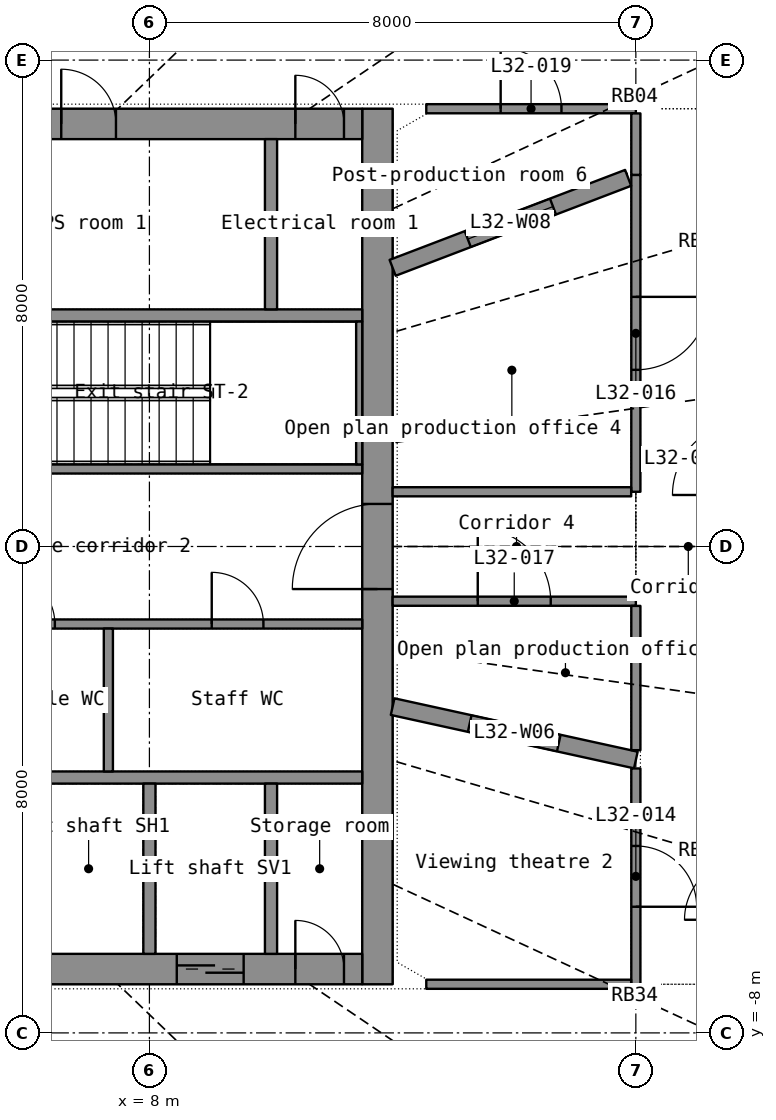
"""IFC4 building model, lengths in metres.
Left out: names, types, materials, properties, quantities, classifications, styles, units other than length and angle.
Written with IfcOpenShell. Run it as: python <this file> out.ifc"""

import sys

from ifc_helpers import new_model, si_unit, direction, frame, frame_2d, origin, place, context, subcontext, project, spatial, rectangle, extrude, element, fill, save


model = new_model("IFC4")
c1 = context("Model", 3, precision=1e-05, world=origin(), true_north=direction((0.0, 1.0)))
c2 = subcontext(c1, "Body", "Model", "MODEL_VIEW")
j1 = project(units=[si_unit("LENGTHUNIT", "METRE"), si_unit("PLANEANGLEUNIT", "RADIAN")], contexts=[c1])
p1 = place(None, origin())
s1 = spatial("IfcSite", under=j1, at=p1, CompositionType="ELEMENT")
p2 = place(p1, origin())
s2 = spatial("IfcBuilding", under=s1, at=p2, CompositionType="ELEMENT")
p3 = place(p2, frame((0.0, 0.0, 134.1)))
s3 = spatial("IfcBuildingStorey", under=s2, at=p3, CompositionType="ELEMENT", Elevation=134.1)
p4 = place(p3, frame((11.75, -7.2, 0.0), z_axis=(0.0, 0.0, 1.0), x_axis=(0.0, 1.0, 0.0)))
e1 = element("IfcWall", 1, at=p4, inside=s3, PredefinedType="SHEAR", context=c2, shape_type="SweptSolid", body=[
    extrude(rectangle(XDim=14.4, YDim=0.5, at=frame_2d((7.2, 0.0))), origin(), (0.0, 0.0, 1.0), 3.3),
])
p5 = place(p4, frame((6.5, 0.0, 0.0)))
e2 = element("IfcOpeningElement", 2, at=p5, cuts=e1, PredefinedType="OPENING", context=c2, shape_type="SweptSolid", body=[
    extrude(rectangle(XDim=1.4, YDim=2.2, at=frame_2d((0.7, 1.1))), frame((0.0, 0.26, 0.0), z_axis=(0.0, -1.0, 0.0), x_axis=(1.0, 0.0, 0.0)), (0.0, 0.0, 1.0), 0.52),
])
p6 = place(p3, frame((-11.5, -6.95, 0.0), z_axis=(0.0, 0.0, 1.0), x_axis=(1.0, 0.0, 0.0)))
e3 = element("IfcWall", 3, at=p6, inside=s3, PredefinedType="SHEAR", context=c2, shape_type="SweptSolid", body=[
    extrude(rectangle(XDim=23.0, YDim=0.5, at=frame_2d((11.5, 0.0))), origin(), (0.0, 0.0, 1.0), 3.3),
])
p7 = place(p6, frame((1.95, 0.0, 0.0)))
e4 = element("IfcOpeningElement", 4, at=p7, cuts=e3, PredefinedType="OPENING", context=c2, shape_type="SweptSolid", body=[
    extrude(rectangle(XDim=1.1, YDim=2.2, at=frame_2d((0.55, 1.1))), frame((0.0, 0.26, 0.0), z_axis=(0.0, -1.0, 0.0), x_axis=(1.0, 0.0, 0.0)), (0.0, 0.0, 1.0), 0.52),
])
p8 = place(p6, frame((3.95, 0.0, 0.0)))
e5 = element("IfcOpeningElement", 5, at=p8, cuts=e3, PredefinedType="OPENING", context=c2, shape_type="SweptSolid", body=[
    extrude(rectangle(XDim=1.1, YDim=2.2, at=frame_2d((0.55, 1.1))), frame((0.0, 0.26, 0.0), z_axis=(0.0, -1.0, 0.0), x_axis=(1.0, 0.0, 0.0)), (0.0, 0.0, 1.0), 0.52),
])
p9 = place(p6, frame((5.95, 0.0, 0.0)))
e6 = element("IfcOpeningElement", 6, at=p9, cuts=e3, PredefinedType="OPENING", context=c2, shape_type="SweptSolid", body=[
    extrude(rectangle(XDim=1.1, YDim=2.2, at=frame_2d((0.55, 1.1))), frame((0.0, 0.26, 0.0), z_axis=(0.0, -1.0, 0.0), x_axis=(1.0, 0.0, 0.0)), (0.0, 0.0, 1.0), 0.52),
])
p10 = place(p6, frame((7.95, 0.0, 0.0)))
e7 = element("IfcOpeningElement", 7, at=p10, cuts=e3, PredefinedType="OPENING", context=c2, shape_type="SweptSolid", body=[
    extrude(rectangle(XDim=1.1, YDim=2.2, at=frame_2d((0.55, 1.1))), frame((0.0, 0.26, 0.0), z_axis=(0.0, -1.0, 0.0), x_axis=(1.0, 0.0, 0.0)), (0.0, 0.0, 1.0), 0.52),
])
p11 = place(p6, frame((9.95, 0.0, 0.0)))
e8 = element("IfcOpeningElement", 8, at=p11, cuts=e3, PredefinedType="OPENING", context=c2, shape_type="SweptSolid", body=[
    extrude(rectangle(XDim=1.1, YDim=2.2, at=frame_2d((0.55, 1.1))), frame((0.0, 0.26, 0.0), z_axis=(0.0, -1.0, 0.0), x_axis=(1.0, 0.0, 0.0)), (0.0, 0.0, 1.0), 0.52),
])
p12 = place(p6, frame((11.95, 0.0, 0.0)))
e9 = element("IfcOpeningElement", 9, at=p12, cuts=e3, PredefinedType="OPENING", context=c2, shape_type="SweptSolid", body=[
    extrude(rectangle(XDim=1.1, YDim=2.2, at=frame_2d((0.55, 1.1))), frame((0.0, 0.26, 0.0), z_axis=(0.0, -1.0, 0.0), x_axis=(1.0, 0.0, 0.0)), (0.0, 0.0, 1.0), 0.52),
])
p13 = place(p6, frame((13.95, 0.0, 0.0)))
e10 = element("IfcOpeningElement", 10, at=p13, cuts=e3, PredefinedType="OPENING", context=c2, shape_type="SweptSolid", body=[
    extrude(rectangle(XDim=1.1, YDim=2.2, at=frame_2d((0.55, 1.1))), frame((0.0, 0.26, 0.0), z_axis=(0.0, -1.0, 0.0), x_axis=(1.0, 0.0, 0.0)), (0.0, 0.0, 1.0), 0.52),
])
p14 = place(p6, frame((15.95, 0.0, 0.0)))
e11 = element("IfcOpeningElement", 11, at=p14, cuts=e3, PredefinedType="OPENING", context=c2, shape_type="SweptSolid", body=[
    extrude(rectangle(XDim=1.1, YDim=2.2, at=frame_2d((0.55, 1.1))), frame((0.0, 0.26, 0.0), z_axis=(0.0, -1.0, 0.0), x_axis=(1.0, 0.0, 0.0)), (0.0, 0.0, 1.0), 0.52),
])
p15 = place(p6, frame((19.95, 0.0, 0.0)))
e12 = element("IfcOpeningElement", 12, at=p15, cuts=e3, PredefinedType="OPENING", context=c2, shape_type="SweptSolid", body=[
    extrude(rectangle(XDim=1.1, YDim=2.2, at=frame_2d((0.55, 1.1))), frame((0.0, 0.26, 0.0), z_axis=(0.0, -1.0, 0.0), x_axis=(1.0, 0.0, 0.0)), (0.0, 0.0, 1.0), 0.52),
])
p16 = place(p6, frame((0.3, 0.0, 0.0)))
e13 = element("IfcOpeningElement", 13, at=p16, cuts=e3, PredefinedType="OPENING", context=c2, shape_type="SweptSolid", body=[
    extrude(rectangle(XDim=0.8, YDim=2.05, at=frame_2d((0.4, 1.025))), frame((0.0, 0.26, 0.0), z_axis=(0.0, -1.0, 0.0), x_axis=(1.0, 0.0, 0.0)), (0.0, 0.0, 1.0), 0.52),
])
p17 = place(p6, frame((21.9, 0.0, 0.0)))
e14 = element("IfcOpeningElement", 14, at=p17, cuts=e3, PredefinedType="OPENING", context=c2, shape_type="SweptSolid", body=[
    extrude(rectangle(XDim=0.8, YDim=2.05, at=frame_2d((0.4, 1.025))), frame((0.0, 0.26, 0.0), z_axis=(0.0, -1.0, 0.0), x_axis=(1.0, 0.0, 0.0)), (0.0, 0.0, 1.0), 0.52),
])
p18 = place(p3, frame((-11.5, 6.95, 0.0), z_axis=(0.0, 0.0, 1.0), x_axis=(1.0, 0.0, 0.0)))
e15 = element("IfcWall", 15, at=p18, inside=s3, PredefinedType="SHEAR", context=c2, shape_type="SweptSolid", body=[
    extrude(rectangle(XDim=23.0, YDim=0.5, at=frame_2d((11.5, 0.0))), origin(), (0.0, 0.0, 1.0), 3.3),
])
p19 = place(p18, frame((1.95, 0.0, 0.0)))
e16 = element("IfcOpeningElement", 16, at=p19, cuts=e15, PredefinedType="OPENING", context=c2, shape_type="SweptSolid", body=[
    extrude(rectangle(XDim=1.1, YDim=2.2, at=frame_2d((0.55, 1.1))), frame((0.0, 0.26, 0.0), z_axis=(0.0, -1.0, 0.0), x_axis=(1.0, 0.0, 0.0)), (0.0, 0.0, 1.0), 0.52),
])
p20 = place(p18, frame((10.05, 0.0, 0.0)))
e17 = element("IfcOpeningElement", 17, at=p20, cuts=e15, PredefinedType="OPENING", context=c2, shape_type="SweptSolid", body=[
    extrude(rectangle(XDim=0.9, YDim=2.1, at=frame_2d((0.45, 1.05))), frame((0.0, 0.26, 0.0), z_axis=(0.0, -1.0, 0.0), x_axis=(1.0, 0.0, 0.0)), (0.0, 0.0, 1.0), 0.52),
])
p21 = place(p18, frame((18.05, 0.0, 0.0)))
e18 = element("IfcOpeningElement", 18, at=p21, cuts=e15, PredefinedType="OPENING", context=c2, shape_type="SweptSolid", body=[
    extrude(rectangle(XDim=0.9, YDim=2.1, at=frame_2d((0.45, 1.05))), frame((0.0, 0.26, 0.0), z_axis=(0.0, -1.0, 0.0), x_axis=(1.0, 0.0, 0.0)), (0.0, 0.0, 1.0), 0.52),
])
p22 = place(p18, frame((0.3, 0.0, 0.0)))
e19 = element("IfcOpeningElement", 19, at=p22, cuts=e15, PredefinedType="OPENING", context=c2, shape_type="SweptSolid", body=[
    extrude(rectangle(XDim=0.8, YDim=2.05, at=frame_2d((0.4, 1.025))), frame((0.0, 0.26, 0.0), z_axis=(0.0, -1.0, 0.0), x_axis=(1.0, 0.0, 0.0)), (0.0, 0.0, 1.0), 0.52),
])
p23 = place(p18, frame((21.9, 0.0, 0.0)))
e20 = element("IfcOpeningElement", 20, at=p23, cuts=e15, PredefinedType="OPENING", context=c2, shape_type="SweptSolid", body=[
    extrude(rectangle(XDim=0.8, YDim=2.05, at=frame_2d((0.4, 1.025))), frame((0.0, 0.26, 0.0), z_axis=(0.0, -1.0, 0.0), x_axis=(1.0, 0.0, 0.0)), (0.0, 0.0, 1.0), 0.52),
])
for number, where, z_axis, x_axis in (
    (21, (-11.5, -3.8, 0.0), (0.0, 0.0, 1.0), (1.0, 0.0, 0.0)),
    (22, (-11.5, 3.8, 0.0), (0.0, 0.0, 1.0), (1.0, 0.0, 0.0)),
):
    element("IfcWall", number, at=place(p3, frame(where, z_axis=z_axis, x_axis=x_axis)), inside=s3, PredefinedType="SHEAR", context=c2, shape_type="SweptSolid", body=[
        extrude(rectangle(XDim=23.0, YDim=0.2, at=frame_2d((11.5, 0.0))), origin(), (0.0, 0.0, 1.0), 3.3),
    ])
for number, where, z_axis, x_axis in (
    (23, (8.0, -6.7, 0.0), (0.0, 0.0, 1.0), (0.0, 1.0, 0.0)),
    (24, (10.0, -6.7, 0.0), (0.0, 0.0, 1.0), (0.0, 1.0, 0.0)),
    (25, (10.0, 3.9, 0.0), (0.0, 0.0, 1.0), (0.0, 1.0, 0.0)),
):
    element("IfcWall", number, at=place(p3, frame(where, z_axis=z_axis, x_axis=x_axis)), inside=s3, PredefinedType="SHEAR", context=c2, shape_type="SweptSolid", body=[
        extrude(rectangle(XDim=2.8, YDim=0.2, at=frame_2d((1.4, 0.0))), origin(), (0.0, 0.0, 1.0), 3.3),
    ])
p24 = place(p3, frame((3.0, -1.275, 0.0), z_axis=(0.0, 0.0, 1.0), x_axis=(1.0, 0.0, 0.0)))
e26 = element("IfcWall", 26, at=p24, inside=s3, PredefinedType="PARTITIONING", context=c2, shape_type="SweptSolid", body=[
    extrude(rectangle(XDim=8.5, YDim=0.15, at=frame_2d((4.25, 0.0))), origin(), (0.0, 0.0, 1.0), 3.3),
])
p25 = place(p24, frame((0.37, 0.0, 0.0)))
e27 = element("IfcOpeningElement", 27, at=p25, cuts=e26, PredefinedType="OPENING", context=c2, shape_type="SweptSolid", body=[
    extrude(rectangle(XDim=0.9, YDim=2.1, at=frame_2d((0.45, 1.05))), frame((0.0, 0.085, 0.0), z_axis=(0.0, -1.0, 0.0), x_axis=(1.0, 0.0, 0.0)), (0.0, 0.0, 1.0), 0.17),
])
p26 = place(p24, frame((2.595, 0.0, 0.0)))
e28 = element("IfcOpeningElement", 28, at=p26, cuts=e26, PredefinedType="OPENING", context=c2, shape_type="SweptSolid", body=[
    extrude(rectangle(XDim=0.85, YDim=2.1, at=frame_2d((0.425, 1.05))), frame((0.0, 0.085, 0.0), z_axis=(0.0, -1.0, 0.0), x_axis=(1.0, 0.0, 0.0)), (0.0, 0.0, 1.0), 0.17),
])
p27 = place(p24, frame((6.025, 0.0, 0.0)))
e29 = element("IfcOpeningElement", 29, at=p27, cuts=e26, PredefinedType="OPENING", context=c2, shape_type="SweptSolid", body=[
    extrude(rectangle(XDim=0.85, YDim=2.1, at=frame_2d((0.425, 1.05))), frame((0.0, 0.085, 0.0), z_axis=(0.0, -1.0, 0.0), x_axis=(1.0, 0.0, 0.0)), (0.0, 0.0, 1.0), 0.17),
])
p28 = place(p3, frame((3.0, 1.275, 0.0), z_axis=(0.0, 0.0, 1.0), x_axis=(1.0, 0.0, 0.0)))
e30 = element("IfcWall", 30, at=p28, inside=s3, PredefinedType="SHEAR", context=c2, shape_type="SweptSolid", body=[
    extrude(rectangle(XDim=8.5, YDim=0.15, at=frame_2d((4.25, 0.0))), origin(), (0.0, 0.0, 1.0), 3.3),
])
p29 = place(p28, frame((2.05, 0.0, 0.0)))
e31 = element("IfcOpeningElement", 31, at=p29, cuts=e30, PredefinedType="OPENING", context=c2, shape_type="SweptSolid", body=[
    extrude(rectangle(XDim=1.1, YDim=2.15, at=frame_2d((0.55, 1.075))), frame((0.0, 0.085, 0.0), z_axis=(0.0, -1.0, 0.0), x_axis=(1.0, 0.0, 0.0)), (0.0, 0.0, 1.0), 0.17),
])
p30 = place(p28, frame((0.45, 0.0, 0.0)))
e32 = element("IfcOpeningElement", 32, at=p30, cuts=e30, PredefinedType="OPENING", context=c2, shape_type="SweptSolid", body=[
    extrude(rectangle(XDim=0.9, YDim=2.1, at=frame_2d((0.45, 1.05))), frame((0.0, 0.085, 0.0), z_axis=(0.0, -1.0, 0.0), x_axis=(1.0, 0.0, 0.0)), (0.0, 0.0, 1.0), 0.17),
])
p31 = place(p3, frame((11.45, 1.35, 0.0), z_axis=(0.0, 0.0, 1.0), x_axis=(0.0, 1.0, 0.0)))
e33 = element("IfcWall", 33, at=p31, inside=s3, PredefinedType="SHEAR", context=c2, shape_type="SweptSolid", body=[
    extrude(rectangle(XDim=2.35, YDim=0.1, at=frame_2d((1.175, 0.0))), origin(), (0.0, 0.0, 1.0), 3.3),
])
p32 = place(p3, frame((7.325, -3.7, 0.0), z_axis=(0.0, 0.0, 1.0), x_axis=(0.0, 1.0, 0.0)))
e34 = element("IfcWall", 34, at=p32, inside=s3, PredefinedType="PARTITIONING", context=c2, shape_type="SweptSolid", body=[
    extrude(rectangle(XDim=2.35, YDim=0.15, at=frame_2d((1.175, 0.0))), origin(), (0.0, 0.0, 1.0), 3.3),
])
p33 = place(p3, frame((16.0, 6.111, 0.0), z_axis=(0.0, 0.0, 1.0), x_axis=(0.0, -1.0, 0.0)))
e35 = element("IfcWall", 35, at=p33, inside=s3, PredefinedType="PARTITIONING", context=c2, shape_type="SweptSolid", body=[
    extrude(rectangle(XDim=5.211, YDim=0.15, at=frame_2d((2.606, 0.0))), origin(), (0.0, 0.0, 1.0), 2.4),
])
p34 = place(p33, frame((2.006, 0.0, 0.0)))
e36 = element("IfcOpeningElement", 36, at=p34, cuts=e35, PredefinedType="OPENING", context=c2, shape_type="SweptSolid", body=[
    extrude(rectangle(XDim=1.2, YDim=2.2, at=frame_2d((0.6, 1.1))), frame((0.0, 0.085, 0.0), z_axis=(0.0, -1.0, 0.0), x_axis=(1.0, 0.0, 0.0)), (0.0, 0.0, 1.0), 0.17),
])
p35 = place(p3, frame((15.873, 6.063, 0.0), z_axis=(0.0, 0.0, 1.0), x_axis=(-0.934170215, -0.356827703, 0.0)))
e37 = element("IfcWall", 37, at=p35, inside=s3, PredefinedType="PARTITIONING", context=c2, shape_type="SweptSolid", body=[
    extrude(rectangle(XDim=4.146, YDim=0.28, at=frame_2d((2.073, 0.0))), origin(), (0.0, 0.0, 1.0), 2.4),
])
p36 = place(p35, frame((1.323, 0.0, 1.0)))
e38 = element("IfcOpeningElement", 38, at=p36, cuts=e37, PredefinedType="OPENING", context=c2, shape_type="SweptSolid", body=[
    extrude(rectangle(XDim=1.5, YDim=1.2, at=frame_2d((0.75, 0.6))), frame((0.0, 0.15, 0.0), z_axis=(0.0, -1.0, 0.0), x_axis=(1.0, 0.0, 0.0)), (0.0, 0.0, 1.0), 0.3),
])
p37 = place(p3, frame((16.0, -3.512, 0.0), z_axis=(0.0, 0.0, 1.0), x_axis=(-0.976750433, 0.214379551, 0.0)))
e39 = element("IfcWall", 39, at=p37, inside=s3, PredefinedType="PARTITIONING", context=c2, shape_type="SweptSolid", body=[
    extrude(rectangle(XDim=4.095, YDim=0.28, at=frame_2d((2.048, 0.0))), origin(), (0.0, 0.0, 1.0), 2.4),
])
p38 = place(p37, frame((1.298, 0.0, 1.0)))
e40 = element("IfcOpeningElement", 40, at=p38, cuts=e39, PredefinedType="OPENING", context=c2, shape_type="SweptSolid", body=[
    extrude(rectangle(XDim=1.5, YDim=1.2, at=frame_2d((0.75, 0.6))), frame((0.0, 0.15, 0.0), z_axis=(0.0, -1.0, 0.0), x_axis=(1.0, 0.0, 0.0)), (0.0, 0.0, 1.0), 0.3),
])
p39 = place(p3, frame((12.0, -0.9, 0.0), z_axis=(0.0, 0.0, 1.0), x_axis=(1.0, 0.0, 0.0)))
e41 = element("IfcWall", 41, at=p39, inside=s3, PredefinedType="PARTITIONING", context=c2, shape_type="SweptSolid", body=[
    extrude(rectangle(XDim=4.0, YDim=0.15, at=frame_2d((2.0, 0.0))), origin(), (0.0, 0.0, 1.0), 2.4),
])
p40 = place(p39, frame((1.4, 0.0, 0.0)))
e42 = element("IfcOpeningElement", 42, at=p40, cuts=e41, PredefinedType="OPENING", context=c2, shape_type="SweptSolid", body=[
    extrude(rectangle(XDim=1.2, YDim=2.2, at=frame_2d((0.6, 1.1))), frame((0.0, 0.085, 0.0), z_axis=(0.0, -1.0, 0.0), x_axis=(1.0, 0.0, 0.0)), (0.0, 0.0, 1.0), 0.17),
])
p41 = place(p3, frame((15.923, 0.9, 0.0), z_axis=(0.0, 0.0, 1.0), x_axis=(-1.0, 0.0, 0.0)))
e43 = element("IfcWall", 43, at=p41, inside=s3, PredefinedType="PARTITIONING", context=c2, shape_type="SweptSolid", body=[
    extrude(rectangle(XDim=3.923, YDim=0.15, at=frame_2d((1.961, 0.0))), origin(), (0.0, 0.0, 1.0), 2.4),
])
p42 = place(p3, frame((16.0, -3.65, 0.0), z_axis=(0.0, 0.0, 1.0), x_axis=(0.0, -1.0, 0.0)))
e44 = element("IfcWall", 44, at=p42, inside=s3, PredefinedType="PARTITIONING", context=c2, shape_type="SweptSolid", body=[
    extrude(rectangle(XDim=3.55, YDim=0.15, at=frame_2d((1.775, 0.0))), origin(), (0.0, 0.0, 1.0), 2.4),
])
p43 = place(p42, frame((1.275, 0.0, 0.0)))
e45 = element("IfcOpeningElement", 45, at=p43, cuts=e44, PredefinedType="OPENING", context=c2, shape_type="SweptSolid", body=[
    extrude(rectangle(XDim=1.0, YDim=2.2, at=frame_2d((0.5, 1.1))), frame((0.0, 0.085, 0.0), z_axis=(0.0, -1.0, 0.0), x_axis=(1.0, 0.0, 0.0)), (0.0, 0.0, 1.0), 0.17),
])
p44 = place(p3, frame((12.553, 7.2, 0.0), z_axis=(0.0, 0.0, 1.0), x_axis=(1.0, 0.0, 0.0)))
e46 = element("IfcWall", 46, at=p44, inside=s3, PredefinedType="PARTITIONING", context=c2, shape_type="SweptSolid", body=[
    extrude(rectangle(XDim=3.447, YDim=0.15, at=frame_2d((1.723, 0.0))), origin(), (0.0, 0.0, 1.0), 2.4),
])
p45 = place(p44, frame((1.223, 0.0, 0.0)))
e47 = element("IfcOpeningElement", 47, at=p45, cuts=e46, PredefinedType="OPENING", context=c2, shape_type="SweptSolid", body=[
    extrude(rectangle(XDim=1.0, YDim=2.2, at=frame_2d((0.5, 1.1))), frame((0.0, 0.085, 0.0), z_axis=(0.0, -1.0, 0.0), x_axis=(1.0, 0.0, 0.0)), (0.0, 0.0, 1.0), 0.17),
])
p46 = place(p3, frame((15.923, -7.2, 0.0), z_axis=(0.0, 0.0, 1.0), x_axis=(-1.0, 0.0, 0.0)))
e48 = element("IfcWall", 48, at=p46, inside=s3, PredefinedType="PARTITIONING", context=c2, shape_type="SweptSolid", body=[
    extrude(rectangle(XDim=3.37, YDim=0.15, at=frame_2d((1.685, 0.0))), origin(), (0.0, 0.0, 1.0), 2.4),
])
p47 = place(p3, frame((16.0, -0.977, 0.0), z_axis=(0.0, 0.0, 1.0), x_axis=(0.0, -1.0, 0.0)))
e49 = element("IfcWall", 49, at=p47, inside=s3, PredefinedType="PARTITIONING", context=c2, shape_type="SweptSolid", body=[
    extrude(rectangle(XDim=2.373, YDim=0.15, at=frame_2d((1.187, 0.0))), origin(), (0.0, 0.0, 1.0), 2.4),
])
p48 = place(p3, frame((16.0, 7.123, 0.0), z_axis=(0.0, 0.0, 1.0), x_axis=(0.0, -1.0, 0.0)))
e50 = element("IfcWall", 50, at=p48, inside=s3, PredefinedType="PARTITIONING", context=c2, shape_type="SweptSolid", body=[
    extrude(rectangle(XDim=1.011, YDim=0.15, at=frame_2d((0.505, 0.0))), origin(), (0.0, 0.0, 1.0), 2.4),
])
p49 = place(p15, origin())
e51 = element("IfcDoor", 51, at=p49, inside=s3, OperationType="DOUBLE_DOOR_SLIDING", PredefinedType="DOOR", context=c2, shape_type="SweptSolid", body=[
    extrude(rectangle(XDim=1.1, YDim=2.2, at=frame_2d((0.55, 1.1))), frame((0.0, 0.025, 0.0), z_axis=(0.0, -1.0, 0.0), x_axis=(1.0, 0.0, 0.0)), (0.0, 0.0, 1.0), 0.05),
])
fill(e12, e51)
p50 = place(p17, origin())
e52 = element("IfcDoor", 52, at=p50, inside=s3, OperationType="SINGLE_SWING_LEFT", PredefinedType="DOOR", context=c2, shape_type="SweptSolid", body=[
    extrude(rectangle(XDim=0.8, YDim=2.05, at=frame_2d((0.4, 1.025))), frame((0.0, 0.025, 0.0), z_axis=(0.0, -1.0, 0.0), x_axis=(1.0, 0.0, 0.0)), (0.0, 0.0, 1.0), 0.05),
])
fill(e14, e52)
p51 = place(p21, origin())
e53 = element("IfcDoor", 53, at=p51, inside=s3, OperationType="SINGLE_SWING_LEFT", PredefinedType="DOOR", context=c2, shape_type="SweptSolid", body=[
    extrude(rectangle(XDim=0.9, YDim=2.1, at=frame_2d((0.45, 1.05))), frame((0.0, 0.025, 0.0), z_axis=(0.0, -1.0, 0.0), x_axis=(1.0, 0.0, 0.0)), (0.0, 0.0, 1.0), 0.05),
])
fill(e18, e53)
p52 = place(p23, origin())
e54 = element("IfcDoor", 54, at=p52, inside=s3, OperationType="SINGLE_SWING_LEFT", PredefinedType="DOOR", context=c2, shape_type="SweptSolid", body=[
    extrude(rectangle(XDim=0.8, YDim=2.05, at=frame_2d((0.4, 1.025))), frame((0.0, 0.025, 0.0), z_axis=(0.0, -1.0, 0.0), x_axis=(1.0, 0.0, 0.0)), (0.0, 0.0, 1.0), 0.05),
])
fill(e20, e54)
p53 = place(p5, origin())
e55 = element("IfcDoor", 55, at=p53, inside=s3, OperationType="DOUBLE_DOOR_SINGLE_SWING", PredefinedType="DOOR", context=c2, shape_type="SweptSolid", body=[
    extrude(rectangle(XDim=1.4, YDim=2.2, at=frame_2d((0.7, 1.1))), frame((0.0, 0.025, 0.0), z_axis=(0.0, -1.0, 0.0), x_axis=(1.0, 0.0, 0.0)), (0.0, 0.0, 1.0), 0.05),
])
fill(e2, e55)
p54 = place(p26, origin())
e56 = element("IfcDoor", 56, at=p54, inside=s3, OperationType="SINGLE_SWING_LEFT", PredefinedType="DOOR", context=c2, shape_type="SweptSolid", body=[
    extrude(rectangle(XDim=0.85, YDim=2.1, at=frame_2d((0.425, 1.05))), frame((0.0, 0.025, 0.0), z_axis=(0.0, -1.0, 0.0), x_axis=(1.0, 0.0, 0.0)), (0.0, 0.0, 1.0), 0.05),
])
fill(e28, e56)
p55 = place(p27, origin())
e57 = element("IfcDoor", 57, at=p55, inside=s3, OperationType="SINGLE_SWING_LEFT", PredefinedType="DOOR", context=c2, shape_type="SweptSolid", body=[
    extrude(rectangle(XDim=0.85, YDim=2.1, at=frame_2d((0.425, 1.05))), frame((0.0, 0.025, 0.0), z_axis=(0.0, -1.0, 0.0), x_axis=(1.0, 0.0, 0.0)), (0.0, 0.0, 1.0), 0.05),
])
fill(e29, e57)
p56 = place(p43, origin())
e58 = element("IfcDoor", 58, at=p56, inside=s3, OperationType="SINGLE_SWING_RIGHT", PredefinedType="DOOR", context=c2, shape_type="SweptSolid", body=[
    extrude(rectangle(XDim=1.0, YDim=2.2, at=frame_2d((0.5, 1.1))), frame((0.0, 0.025, 0.0), z_axis=(0.0, -1.0, 0.0), x_axis=(1.0, 0.0, 0.0)), (0.0, 0.0, 1.0), 0.05),
])
fill(e45, e58)
p57 = place(p34, origin())
e59 = element("IfcDoor", 59, at=p57, inside=s3, OperationType="DOUBLE_DOOR_SINGLE_SWING", PredefinedType="DOOR", context=c2, shape_type="SweptSolid", body=[
    extrude(rectangle(XDim=1.2, YDim=2.2, at=frame_2d((0.6, 1.1))), frame((0.0, 0.025, 0.0), z_axis=(0.0, -1.0, 0.0), x_axis=(1.0, 0.0, 0.0)), (0.0, 0.0, 1.0), 0.05),
])
fill(e36, e59)
p58 = place(p40, origin())
e60 = element("IfcDoor", 60, at=p58, inside=s3, OperationType="DOUBLE_DOOR_SINGLE_SWING", PredefinedType="DOOR", context=c2, shape_type="SweptSolid", body=[
    extrude(rectangle(XDim=1.2, YDim=2.2, at=frame_2d((0.6, 1.1))), frame((0.0, 0.025, 0.0), z_axis=(0.0, -1.0, 0.0), x_axis=(1.0, 0.0, 0.0)), (0.0, 0.0, 1.0), 0.05),
])
fill(e42, e60)
p59 = place(p45, origin())
e61 = element("IfcDoor", 61, at=p59, inside=s3, OperationType="SINGLE_SWING_LEFT", PredefinedType="DOOR", context=c2, shape_type="SweptSolid", body=[
    extrude(rectangle(XDim=1.0, YDim=2.2, at=frame_2d((0.5, 1.1))), frame((0.0, 0.025, 0.0), z_axis=(0.0, -1.0, 0.0), x_axis=(1.0, 0.0, 0.0)), (0.0, 0.0, 1.0), 0.05),
])
fill(e47, e61)
p60 = place(p38, origin())
e62 = element("IfcWindow", 62, at=p60, inside=s3, PartitioningType="SINGLE_PANEL", PredefinedType="WINDOW", context=c2, shape_type="SweptSolid", body=[
    extrude(rectangle(XDim=1.5, YDim=1.2, at=frame_2d((0.75, 0.6))), frame((0.0, 0.03, 0.0), z_axis=(0.0, -1.0, 0.0), x_axis=(1.0, 0.0, 0.0)), (0.0, 0.0, 1.0), 0.06),
])
fill(e40, e62)
p61 = place(p36, origin())
e63 = element("IfcWindow", 63, at=p61, inside=s3, PartitioningType="SINGLE_PANEL", PredefinedType="WINDOW", context=c2, shape_type="SweptSolid", body=[
    extrude(rectangle(XDim=1.5, YDim=1.2, at=frame_2d((0.75, 0.6))), frame((0.0, 0.03, 0.0), z_axis=(0.0, -1.0, 0.0), x_axis=(1.0, 0.0, 0.0)), (0.0, 0.0, 1.0), 0.06),
])
fill(e38, e63)
save(model, sys.argv[1])
